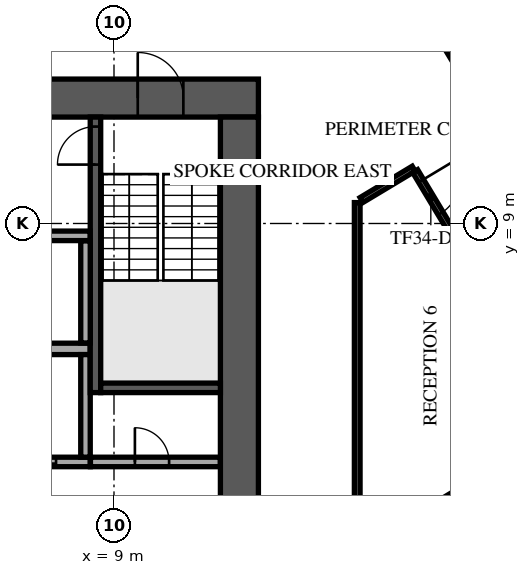
"""IFC4 building model, lengths in metres.
Left out: names, types, materials, properties, quantities, classifications, styles, units other than length and angle.
Written with IfcOpenShell. Run it as: python <this file> out.ifc"""

import sys

from ifc_helpers import new_model, si_unit, direction, frame, frame_2d, origin, place, context, subcontext, project, spatial, rectangle, extrude, element, fill, save


model = new_model("IFC4")
c1 = context("Model", 3, precision=1e-05, world=origin(), true_north=direction((0.0, 1.0)))
c2 = subcontext(c1, "Body", "Model", "MODEL_VIEW")
j1 = project(units=[si_unit("LENGTHUNIT", "METRE"), si_unit("PLANEANGLEUNIT", "RADIAN")], contexts=[c1])
p1 = place(None, origin())
s1 = spatial("IfcSite", under=j1, at=p1, CompositionType="ELEMENT")
p2 = place(p1, origin())
s2 = spatial("IfcBuilding", under=s1, at=p2, CompositionType="ELEMENT")
p3 = place(p2, frame((0.0, 0.0, 147.7)))
s3 = spatial("IfcBuildingStorey", under=s2, at=p3, CompositionType="ELEMENT", Elevation=147.7)
p4 = place(p3, frame((-12.8, 12.3, 0.0), z_axis=(0.0, 0.0, 1.0), x_axis=(1.0, 0.0, 0.0)))
e1 = element("IfcWall", 1, at=p4, inside=s3, PredefinedType="SHEAR", context=c2, shape_type="SweptSolid", body=[
    extrude(rectangle(XDim=25.6, YDim=1.0, at=frame_2d((12.8, 0.0))), origin(), (0.0, 0.0, 1.0), 3.6),
])
p5 = place(p4, frame((11.6, 0.0, 0.0)))
e2 = element("IfcOpeningElement", 2, at=p5, cuts=e1, PredefinedType="OPENING", context=c2, shape_type="SweptSolid", body=[
    extrude(rectangle(XDim=2.4, YDim=2.4, at=frame_2d((1.2, 1.2))), frame((0.0, 0.51, 0.0), z_axis=(0.0, -1.0, 0.0), x_axis=(1.0, 0.0, 0.0)), (0.0, 0.0, 1.0), 1.02),
])
p6 = place(p4, frame((22.425, 0.0, 0.0)))
e3 = element("IfcOpeningElement", 3, at=p6, cuts=e1, PredefinedType="OPENING", context=c2, shape_type="SweptSolid", body=[
    extrude(rectangle(XDim=1.2, YDim=2.1, at=frame_2d((0.6, 1.05))), frame((0.0, 0.51, 0.0), z_axis=(0.0, -1.0, 0.0), x_axis=(1.0, 0.0, 0.0)), (0.0, 0.0, 1.0), 1.02),
])
p7 = place(p4, frame((1.4, 0.0, 0.0)))
e4 = element("IfcOpeningElement", 4, at=p7, cuts=e1, PredefinedType="OPENING", context=c2, shape_type="SweptSolid", body=[
    extrude(rectangle(XDim=1.0, YDim=2.1, at=frame_2d((0.5, 1.05))), frame((0.0, 0.51, 0.0), z_axis=(0.0, -1.0, 0.0), x_axis=(1.0, 0.0, 0.0)), (0.0, 0.0, 1.0), 1.02),
])
p8 = place(p3, frame((12.3, -11.8, 0.0), z_axis=(0.0, 0.0, 1.0), x_axis=(0.0, 1.0, 0.0)))
e5 = element("IfcWall", 5, at=p8, inside=s3, PredefinedType="SHEAR", context=c2, shape_type="SweptSolid", body=[
    extrude(rectangle(XDim=23.6, YDim=1.0, at=frame_2d((11.8, 0.0))), origin(), (0.0, 0.0, 1.0), 3.6),
])
p9 = place(p8, frame((10.6, 0.0, 0.0)))
e6 = element("IfcOpeningElement", 6, at=p9, cuts=e5, PredefinedType="OPENING", context=c2, shape_type="SweptSolid", body=[
    extrude(rectangle(XDim=2.4, YDim=2.4, at=frame_2d((1.2, 1.2))), frame((0.0, 0.51, 0.0), z_axis=(0.0, -1.0, 0.0), x_axis=(1.0, 0.0, 0.0)), (0.0, 0.0, 1.0), 1.02),
])
p10 = place(p3, frame((-8.375, 5.7, 0.0), z_axis=(0.0, 0.0, 1.0), x_axis=(1.0, 0.0, 0.0)))
e7 = element("IfcWall", 7, at=p10, inside=s3, PredefinedType="SOLIDWALL", context=c2, shape_type="SweptSolid", body=[
    extrude(rectangle(XDim=16.75, YDim=0.3, at=frame_2d((8.375, 0.0))), origin(), (0.0, 0.0, 1.0), 3.6),
])
p11 = place(p3, frame((-8.375, 2.725, 0.0), z_axis=(0.0, 0.0, 1.0), x_axis=(1.0, 0.0, 0.0)))
e8 = element("IfcWall", 8, at=p11, inside=s3, PredefinedType="SOLIDWALL", context=c2, shape_type="SweptSolid", body=[
    extrude(rectangle(XDim=16.75, YDim=0.25, at=frame_2d((8.375, 0.0))), origin(), (0.0, 0.0, 1.0), 3.6),
])
p12 = place(p11, frame((0.9, 0.0, 0.0)))
e9 = element("IfcOpeningElement", 9, at=p12, cuts=e8, PredefinedType="OPENING", context=c2, shape_type="SweptSolid", body=[
    extrude(rectangle(XDim=1.2, YDim=2.1, at=frame_2d((0.6, 1.05))), frame((0.0, 0.135, 0.0), z_axis=(0.0, -1.0, 0.0), x_axis=(1.0, 0.0, 0.0)), (0.0, 0.0, 1.0), 0.27),
])
p13 = place(p11, frame((3.65, 0.0, 0.0)))
e10 = element("IfcOpeningElement", 10, at=p13, cuts=e8, PredefinedType="OPENING", context=c2, shape_type="SweptSolid", body=[
    extrude(rectangle(XDim=1.2, YDim=2.1, at=frame_2d((0.6, 1.05))), frame((0.0, 0.135, 0.0), z_axis=(0.0, -1.0, 0.0), x_axis=(1.0, 0.0, 0.0)), (0.0, 0.0, 1.0), 0.27),
])
p14 = place(p11, frame((6.4, 0.0, 0.0)))
e11 = element("IfcOpeningElement", 11, at=p14, cuts=e8, PredefinedType="OPENING", context=c2, shape_type="SweptSolid", body=[
    extrude(rectangle(XDim=1.2, YDim=2.1, at=frame_2d((0.6, 1.05))), frame((0.0, 0.135, 0.0), z_axis=(0.0, -1.0, 0.0), x_axis=(1.0, 0.0, 0.0)), (0.0, 0.0, 1.0), 0.27),
])
p15 = place(p11, frame((9.15, 0.0, 0.0)))
e12 = element("IfcOpeningElement", 12, at=p15, cuts=e8, PredefinedType="OPENING", context=c2, shape_type="SweptSolid", body=[
    extrude(rectangle(XDim=1.2, YDim=2.1, at=frame_2d((0.6, 1.05))), frame((0.0, 0.135, 0.0), z_axis=(0.0, -1.0, 0.0), x_axis=(1.0, 0.0, 0.0)), (0.0, 0.0, 1.0), 0.27),
])
p16 = place(p11, frame((11.9, 0.0, 0.0)))
e13 = element("IfcOpeningElement", 13, at=p16, cuts=e8, PredefinedType="OPENING", context=c2, shape_type="SweptSolid", body=[
    extrude(rectangle(XDim=1.2, YDim=2.1, at=frame_2d((0.6, 1.05))), frame((0.0, 0.135, 0.0), z_axis=(0.0, -1.0, 0.0), x_axis=(1.0, 0.0, 0.0)), (0.0, 0.0, 1.0), 0.27),
])
p17 = place(p11, frame((14.65, 0.0, 0.0)))
e14 = element("IfcOpeningElement", 14, at=p17, cuts=e8, PredefinedType="OPENING", context=c2, shape_type="SweptSolid", body=[
    extrude(rectangle(XDim=1.2, YDim=2.1, at=frame_2d((0.6, 1.05))), frame((0.0, 0.135, 0.0), z_axis=(0.0, -1.0, 0.0), x_axis=(1.0, 0.0, 0.0)), (0.0, 0.0, 1.0), 0.27),
])
p18 = place(p3, frame((8.25, 2.85, 0.0), z_axis=(0.0, 0.0, 1.0), x_axis=(0.0, 1.0, 0.0)))
e15 = element("IfcWall", 15, at=p18, inside=s3, PredefinedType="SOLIDWALL", context=c2, shape_type="SweptSolid", body=[
    extrude(rectangle(XDim=2.7, YDim=0.25, at=frame_2d((1.35, 0.0))), origin(), (0.0, 0.0, 1.0), 3.6),
])
p19 = place(p3, frame((8.512, 4.55, 0.0), z_axis=(0.0, 0.0, 1.0), x_axis=(0.0, 1.0, 0.0)))
e16 = element("IfcWall", 16, at=p19, inside=s3, PredefinedType="SOLIDWALL", context=c2, shape_type="SweptSolid", body=[
    extrude(rectangle(XDim=7.25, YDim=0.275, at=frame_2d((3.625, 0.0))), origin(), (0.0, 0.0, 1.0), 3.6),
])
p20 = place(p19, frame((6.0, 0.0, 0.0)))
e17 = element("IfcOpeningElement", 17, at=p20, cuts=e16, PredefinedType="OPENING", context=c2, shape_type="SweptSolid", body=[
    extrude(rectangle(XDim=1.0, YDim=2.1, at=frame_2d((0.5, 1.05))), frame((0.0, 0.147, 0.0), z_axis=(0.0, -1.0, 0.0), x_axis=(1.0, 0.0, 0.0)), (0.0, 0.0, 1.0), 0.295),
])
p21 = place(p3, frame((8.65, 4.675, 0.0), z_axis=(0.0, 0.0, 1.0), x_axis=(1.0, 0.0, 0.0)))
e18 = element("IfcWall", 18, at=p21, inside=s3, PredefinedType="SOLIDWALL", context=c2, shape_type="SweptSolid", body=[
    extrude(rectangle(XDim=3.15, YDim=0.25, at=frame_2d((1.575, 0.0))), origin(), (0.0, 0.0, 1.0), 3.6),
])
p22 = place(p3, frame((8.38, 2.725, 0.0), z_axis=(0.0, 0.0, 1.0), x_axis=(1.0, 0.0, 0.0)))
e19 = element("IfcWall", 19, at=p22, inside=s3, PredefinedType="PARTITIONING", context=c2, shape_type="SweptSolid", body=[
    extrude(rectangle(XDim=3.415, YDim=0.25, at=frame_2d((1.708, 0.0))), origin(), (0.0, 0.0, 1.0), 3.6),
])
p23 = place(p22, frame((1.17, 0.0, 0.0)))
e20 = element("IfcOpeningElement", 20, at=p23, cuts=e19, PredefinedType="OPENING", context=c2, shape_type="SweptSolid", body=[
    extrude(rectangle(XDim=0.9, YDim=2.1, at=frame_2d((0.45, 1.05))), frame((0.0, 0.135, 0.0), z_axis=(0.0, -1.0, 0.0), x_axis=(1.0, 0.0, 0.0)), (0.0, 0.0, 1.0), 0.27),
])
p24 = place(p3, frame((8.25, 5.855, 0.0), z_axis=(0.0, 0.0, 1.0), x_axis=(0.0, 1.0, 0.0)))
e21 = element("IfcWall", 21, at=p24, inside=s3, PredefinedType="PARTITIONING", context=c2, shape_type="SweptSolid", body=[
    extrude(rectangle(XDim=2.69, YDim=0.25, at=frame_2d((1.345, 0.0))), origin(), (0.0, 0.0, 1.0), 3.6),
])
p25 = place(p3, frame((-8.35, 8.675, 0.0), z_axis=(0.0, 0.0, 1.0), x_axis=(1.0, 0.0, 0.0)))
e22 = element("IfcWall", 22, at=p25, inside=s3, PredefinedType="PARTITIONING", context=c2, shape_type="SweptSolid", body=[
    extrude(rectangle(XDim=16.72, YDim=0.25, at=frame_2d((8.36, 0.0))), origin(), (0.0, 0.0, 1.0), 3.6),
])
p26 = place(p25, frame((0.875, 0.0, 0.0)))
e23 = element("IfcOpeningElement", 23, at=p26, cuts=e22, PredefinedType="OPENING", context=c2, shape_type="SweptSolid", body=[
    extrude(rectangle(XDim=1.2, YDim=2.1, at=frame_2d((0.6, 1.05))), frame((0.0, 0.135, 0.0), z_axis=(0.0, -1.0, 0.0), x_axis=(1.0, 0.0, 0.0)), (0.0, 0.0, 1.0), 0.27),
])
p27 = place(p25, frame((9.125, 0.0, 0.0)))
e24 = element("IfcOpeningElement", 24, at=p27, cuts=e22, PredefinedType="OPENING", context=c2, shape_type="SweptSolid", body=[
    extrude(rectangle(XDim=1.2, YDim=2.1, at=frame_2d((0.6, 1.05))), frame((0.0, 0.135, 0.0), z_axis=(0.0, -1.0, 0.0), x_axis=(1.0, 0.0, 0.0)), (0.0, 0.0, 1.0), 0.27),
])
p28 = place(p3, frame((7.558, 34.99, 0.0), z_axis=(0.0, 0.0, 1.0), x_axis=(-0.857166849875, -0.515038825212, 0.0)))
e25 = element("IfcWall", 25, at=p28, inside=s3, PredefinedType="STANDARD", context=c2, shape_type="SweptSolid", body=[
    extrude(rectangle(XDim=49.376, YDim=0.6, at=frame_2d((24.688, 0.0))), origin(), (0.0, 0.0, 1.0), 3.6),
])
p29 = place(p28, frame((1.2, 0.0, 0.9)))
e26 = element("IfcOpeningElement", 26, at=p29, cuts=e25, PredefinedType="OPENING", context=c2, shape_type="SweptSolid", body=[
    extrude(rectangle(XDim=2.1, YDim=2.1, at=frame_2d((1.05, 1.05))), frame((0.0, 0.31, 0.0), z_axis=(0.0, -1.0, 0.0), x_axis=(1.0, 0.0, 0.0)), (0.0, 0.0, 1.0), 0.62),
])
p30 = place(p28, frame((5.7, 0.0, 0.9)))
e27 = element("IfcOpeningElement", 27, at=p30, cuts=e25, PredefinedType="OPENING", context=c2, shape_type="SweptSolid", body=[
    extrude(rectangle(XDim=2.1, YDim=2.1, at=frame_2d((1.05, 1.05))), frame((0.0, 0.31, 0.0), z_axis=(0.0, -1.0, 0.0), x_axis=(1.0, 0.0, 0.0)), (0.0, 0.0, 1.0), 0.62),
])
p31 = place(p28, frame((10.2, 0.0, 0.9)))
e28 = element("IfcOpeningElement", 28, at=p31, cuts=e25, PredefinedType="OPENING", context=c2, shape_type="SweptSolid", body=[
    extrude(rectangle(XDim=2.1, YDim=2.1, at=frame_2d((1.05, 1.05))), frame((0.0, 0.31, 0.0), z_axis=(0.0, -1.0, 0.0), x_axis=(1.0, 0.0, 0.0)), (0.0, 0.0, 1.0), 0.62),
])
p32 = place(p28, frame((14.7, 0.0, 0.9)))
e29 = element("IfcOpeningElement", 29, at=p32, cuts=e25, PredefinedType="OPENING", context=c2, shape_type="SweptSolid", body=[
    extrude(rectangle(XDim=2.1, YDim=2.1, at=frame_2d((1.05, 1.05))), frame((0.0, 0.31, 0.0), z_axis=(0.0, -1.0, 0.0), x_axis=(1.0, 0.0, 0.0)), (0.0, 0.0, 1.0), 0.62),
])
p33 = place(p28, frame((19.2, 0.0, 0.9)))
e30 = element("IfcOpeningElement", 30, at=p33, cuts=e25, PredefinedType="OPENING", context=c2, shape_type="SweptSolid", body=[
    extrude(rectangle(XDim=2.1, YDim=2.1, at=frame_2d((1.05, 1.05))), frame((0.0, 0.31, 0.0), z_axis=(0.0, -1.0, 0.0), x_axis=(1.0, 0.0, 0.0)), (0.0, 0.0, 1.0), 0.62),
])
p34 = place(p28, frame((23.7, 0.0, 0.9)))
e31 = element("IfcOpeningElement", 31, at=p34, cuts=e25, PredefinedType="OPENING", context=c2, shape_type="SweptSolid", body=[
    extrude(rectangle(XDim=2.1, YDim=2.1, at=frame_2d((1.05, 1.05))), frame((0.0, 0.31, 0.0), z_axis=(0.0, -1.0, 0.0), x_axis=(1.0, 0.0, 0.0)), (0.0, 0.0, 1.0), 0.62),
])
p35 = place(p28, frame((28.2, 0.0, 0.9)))
e32 = element("IfcOpeningElement", 32, at=p35, cuts=e25, PredefinedType="OPENING", context=c2, shape_type="SweptSolid", body=[
    extrude(rectangle(XDim=2.1, YDim=2.1, at=frame_2d((1.05, 1.05))), frame((0.0, 0.31, 0.0), z_axis=(0.0, -1.0, 0.0), x_axis=(1.0, 0.0, 0.0)), (0.0, 0.0, 1.0), 0.62),
])
p36 = place(p28, frame((32.7, 0.0, 0.9)))
e33 = element("IfcOpeningElement", 33, at=p36, cuts=e25, PredefinedType="OPENING", context=c2, shape_type="SweptSolid", body=[
    extrude(rectangle(XDim=2.1, YDim=2.1, at=frame_2d((1.05, 1.05))), frame((0.0, 0.31, 0.0), z_axis=(0.0, -1.0, 0.0), x_axis=(1.0, 0.0, 0.0)), (0.0, 0.0, 1.0), 0.62),
])
p37 = place(p28, frame((37.2, 0.0, 0.9)))
e34 = element("IfcOpeningElement", 34, at=p37, cuts=e25, PredefinedType="OPENING", context=c2, shape_type="SweptSolid", body=[
    extrude(rectangle(XDim=2.1, YDim=2.1, at=frame_2d((1.05, 1.05))), frame((0.0, 0.31, 0.0), z_axis=(0.0, -1.0, 0.0), x_axis=(1.0, 0.0, 0.0)), (0.0, 0.0, 1.0), 0.62),
])
p38 = place(p28, frame((41.7, 0.0, 0.9)))
e35 = element("IfcOpeningElement", 35, at=p38, cuts=e25, PredefinedType="OPENING", context=c2, shape_type="SweptSolid", body=[
    extrude(rectangle(XDim=2.1, YDim=2.1, at=frame_2d((1.05, 1.05))), frame((0.0, 0.31, 0.0), z_axis=(0.0, -1.0, 0.0), x_axis=(1.0, 0.0, 0.0)), (0.0, 0.0, 1.0), 0.62),
])
p39 = place(p28, frame((46.138, 0.0, 0.9)))
e36 = element("IfcOpeningElement", 36, at=p39, cuts=e25, PredefinedType="OPENING", context=c2, shape_type="SweptSolid", body=[
    extrude(rectangle(XDim=2.1, YDim=2.1, at=frame_2d((1.05, 1.05))), frame((0.0, 0.31, 0.0), z_axis=(0.0, -1.0, 0.0), x_axis=(1.0, 0.0, 0.0)), (0.0, 0.0, 1.0), 0.62),
])
p40 = place(p3, frame((36.416, -2.94, 0.0), z_axis=(0.0, 0.0, 1.0), x_axis=(-0.515039615037, 0.857166375299, 0.0)))
e37 = element("IfcWall", 37, at=p40, inside=s3, PredefinedType="STANDARD", context=c2, shape_type="SweptSolid", body=[
    extrude(rectangle(XDim=42.176, YDim=0.6, at=frame_2d((21.088, 0.0))), origin(), (0.0, 0.0, 1.0), 3.6),
])
p41 = place(p40, frame((1.138, 0.0, 0.9)))
e38 = element("IfcOpeningElement", 38, at=p41, cuts=e37, PredefinedType="OPENING", context=c2, shape_type="SweptSolid", body=[
    extrude(rectangle(XDim=2.3, YDim=2.1, at=frame_2d((1.15, 1.05))), frame((0.0, 0.31, 0.0), z_axis=(0.0, -1.0, 0.0), x_axis=(1.0, 0.0, 0.0)), (0.0, 0.0, 1.0), 0.62),
])
p42 = place(p40, frame((5.776, 0.0, 0.9)))
e39 = element("IfcOpeningElement", 39, at=p42, cuts=e37, PredefinedType="OPENING", context=c2, shape_type="SweptSolid", body=[
    extrude(rectangle(XDim=2.3, YDim=2.1, at=frame_2d((1.15, 1.05))), frame((0.0, 0.31, 0.0), z_axis=(0.0, -1.0, 0.0), x_axis=(1.0, 0.0, 0.0)), (0.0, 0.0, 1.0), 0.62),
])
p43 = place(p40, frame((10.476, 0.0, 0.9)))
e40 = element("IfcOpeningElement", 40, at=p43, cuts=e37, PredefinedType="OPENING", context=c2, shape_type="SweptSolid", body=[
    extrude(rectangle(XDim=2.3, YDim=2.1, at=frame_2d((1.15, 1.05))), frame((0.0, 0.31, 0.0), z_axis=(0.0, -1.0, 0.0), x_axis=(1.0, 0.0, 0.0)), (0.0, 0.0, 1.0), 0.62),
])
p44 = place(p40, frame((15.176, 0.0, 0.9)))
e41 = element("IfcOpeningElement", 41, at=p44, cuts=e37, PredefinedType="OPENING", context=c2, shape_type="SweptSolid", body=[
    extrude(rectangle(XDim=2.3, YDim=2.1, at=frame_2d((1.15, 1.05))), frame((0.0, 0.31, 0.0), z_axis=(0.0, -1.0, 0.0), x_axis=(1.0, 0.0, 0.0)), (0.0, 0.0, 1.0), 0.62),
])
p45 = place(p40, frame((19.876, 0.0, 0.9)))
e42 = element("IfcOpeningElement", 42, at=p45, cuts=e37, PredefinedType="OPENING", context=c2, shape_type="SweptSolid", body=[
    extrude(rectangle(XDim=2.3, YDim=2.1, at=frame_2d((1.15, 1.05))), frame((0.0, 0.31, 0.0), z_axis=(0.0, -1.0, 0.0), x_axis=(1.0, 0.0, 0.0)), (0.0, 0.0, 1.0), 0.62),
])
p46 = place(p40, frame((24.576, 0.0, 0.9)))
e43 = element("IfcOpeningElement", 43, at=p46, cuts=e37, PredefinedType="OPENING", context=c2, shape_type="SweptSolid", body=[
    extrude(rectangle(XDim=2.3, YDim=2.1, at=frame_2d((1.15, 1.05))), frame((0.0, 0.31, 0.0), z_axis=(0.0, -1.0, 0.0), x_axis=(1.0, 0.0, 0.0)), (0.0, 0.0, 1.0), 0.62),
])
p47 = place(p40, frame((29.276, 0.0, 0.9)))
e44 = element("IfcOpeningElement", 44, at=p47, cuts=e37, PredefinedType="OPENING", context=c2, shape_type="SweptSolid", body=[
    extrude(rectangle(XDim=2.3, YDim=2.1, at=frame_2d((1.15, 1.05))), frame((0.0, 0.31, 0.0), z_axis=(0.0, -1.0, 0.0), x_axis=(1.0, 0.0, 0.0)), (0.0, 0.0, 1.0), 0.62),
])
p48 = place(p40, frame((33.976, 0.0, 0.9)))
e45 = element("IfcOpeningElement", 45, at=p48, cuts=e37, PredefinedType="OPENING", context=c2, shape_type="SweptSolid", body=[
    extrude(rectangle(XDim=2.3, YDim=2.1, at=frame_2d((1.15, 1.05))), frame((0.0, 0.31, 0.0), z_axis=(0.0, -1.0, 0.0), x_axis=(1.0, 0.0, 0.0)), (0.0, 0.0, 1.0), 0.62),
])
p49 = place(p40, frame((38.676, 0.0, 0.9)))
e46 = element("IfcOpeningElement", 46, at=p49, cuts=e37, PredefinedType="OPENING", context=c2, shape_type="SweptSolid", body=[
    extrude(rectangle(XDim=2.3, YDim=2.1, at=frame_2d((1.15, 1.05))), frame((0.0, 0.31, 0.0), z_axis=(0.0, -1.0, 0.0), x_axis=(1.0, 0.0, 0.0)), (0.0, 0.0, 1.0), 0.62),
])
p50 = place(p3, frame((11.76, 23.633, 0.0), z_axis=(0.0, 0.0, 1.0), x_axis=(0.515060503771, -0.857153823684, 0.0)))
e47 = element("IfcWall", 47, at=p50, inside=s3, PredefinedType="PARTITIONING", context=c2, shape_type="SweptSolid", body=[
    extrude(rectangle(XDim=28.475, YDim=0.15, at=frame_2d((14.238, 0.0))), origin(), (0.0, 0.0, 1.0), 3.15),
])
p51 = place(p50, frame((12.149, 0.0, 0.0)))
e48 = element("IfcOpeningElement", 48, at=p51, cuts=e47, PredefinedType="OPENING", context=c2, shape_type="SweptSolid", body=[
    extrude(rectangle(XDim=1.0, YDim=2.1, at=frame_2d((0.5, 1.05))), frame((0.0, 0.085, 0.0), z_axis=(0.0, -1.0, 0.0), x_axis=(1.0, 0.0, 0.0)), (0.0, 0.0, 1.0), 0.17),
])
p52 = place(p50, frame((19.62, 0.0, 0.0)))
e49 = element("IfcOpeningElement", 49, at=p52, cuts=e47, PredefinedType="OPENING", context=c2, shape_type="SweptSolid", body=[
    extrude(rectangle(XDim=1.0, YDim=2.1, at=frame_2d((0.5, 1.05))), frame((0.0, 0.085, 0.0), z_axis=(0.0, -1.0, 0.0), x_axis=(1.0, 0.0, 0.0)), (0.0, 0.0, 1.0), 0.17),
])
p53 = place(p50, frame((26.005, 0.0, 0.0)))
e50 = element("IfcOpeningElement", 50, at=p53, cuts=e47, PredefinedType="OPENING", context=c2, shape_type="SweptSolid", body=[
    extrude(rectangle(XDim=1.8, YDim=2.1, at=frame_2d((0.9, 1.05))), frame((0.0, 0.085, 0.0), z_axis=(0.0, -1.0, 0.0), x_axis=(1.0, 0.0, 0.0)), (0.0, 0.0, 1.0), 0.17),
])
p54 = place(p3, frame((15.4, -9.867, 0.0), z_axis=(0.0, 0.0, 1.0), x_axis=(0.0, 1.0, 0.0)))
e51 = element("IfcWall", 51, at=p54, inside=s3, PredefinedType="PARTITIONING", context=c2, shape_type="SweptSolid", body=[
    extrude(rectangle(XDim=19.417, YDim=0.15, at=frame_2d((9.709, 0.0))), origin(), (0.0, 0.0, 1.0), 3.15),
])
p55 = place(p54, frame((2.55, 0.0, 0.0)))
e52 = element("IfcOpeningElement", 52, at=p55, cuts=e51, PredefinedType="OPENING", context=c2, shape_type="SweptSolid", body=[
    extrude(rectangle(XDim=1.0, YDim=2.1, at=frame_2d((0.5, 1.05))), frame((0.0, 0.085, 0.0), z_axis=(0.0, -1.0, 0.0), x_axis=(1.0, 0.0, 0.0)), (0.0, 0.0, 1.0), 0.17),
])
p56 = place(p3, frame((15.514, 9.618, 0.0), z_axis=(0.0, 0.0, 1.0), x_axis=(0.857129434102, 0.515101090268, 0.0)))
e53 = element("IfcWall", 53, at=p56, inside=s3, PredefinedType="PARTITIONING", context=c2, shape_type="SweptSolid", body=[
    extrude(rectangle(XDim=1.601, YDim=0.15, at=frame_2d((0.801, 0.0))), origin(), (0.0, 0.0, 1.0), 3.15),
])
p57 = place(p3, frame((16.925, 10.379, 0.0), z_axis=(0.0, 0.0, 1.0), x_axis=(0.515094231421, -0.857133555962, 0.0)))
e54 = element("IfcWall", 54, at=p57, inside=s3, PredefinedType="PARTITIONING", context=c2, shape_type="SweptSolid", body=[
    extrude(rectangle(XDim=14.455, YDim=0.15, at=frame_2d((7.228, 0.0))), origin(), (0.0, 0.0, 1.0), 3.15),
])
p58 = place(p57, frame((0.3, 0.0, 0.0)))
e55 = element("IfcOpeningElement", 55, at=p58, cuts=e54, PredefinedType="OPENING", context=c2, shape_type="SweptSolid", body=[
    extrude(rectangle(XDim=1.0, YDim=2.1, at=frame_2d((0.5, 1.05))), frame((0.0, 0.085, 0.0), z_axis=(0.0, -1.0, 0.0), x_axis=(1.0, 0.0, 0.0)), (0.0, 0.0, 1.0), 0.17),
])
p59 = place(p57, frame((8.348, 0.0, 0.0)))
e56 = element("IfcOpeningElement", 56, at=p59, cuts=e54, PredefinedType="OPENING", context=c2, shape_type="SweptSolid", body=[
    extrude(rectangle(XDim=1.0, YDim=2.1, at=frame_2d((0.5, 1.05))), frame((0.0, 0.085, 0.0), z_axis=(0.0, -1.0, 0.0), x_axis=(1.0, 0.0, 0.0)), (0.0, 0.0, 1.0), 0.17),
])
p60 = place(p3, frame((15.501, 0.426, 0.0), z_axis=(0.0, 0.0, 1.0), x_axis=(0.857114899057, 0.515125275845, 0.0)))
e57 = element("IfcWall", 57, at=p60, inside=s3, PredefinedType="PARTITIONING", context=c2, shape_type="SweptSolid", body=[
    extrude(rectangle(XDim=6.272, YDim=0.1, at=frame_2d((3.136, 0.0))), origin(), (0.0, 0.0, 1.0), 3.15),
])
p61 = place(p6, origin())
e58 = element("IfcDoor", 58, at=p61, inside=s3, OperationType="SINGLE_SWING_LEFT", PredefinedType="DOOR", context=c2, shape_type="SweptSolid", body=[
    extrude(rectangle(XDim=1.2, YDim=2.1, at=frame_2d((0.6, 1.05))), frame((0.0, 0.025, 0.0), z_axis=(0.0, -1.0, 0.0), x_axis=(1.0, 0.0, 0.0)), (0.0, 0.0, 1.0), 0.05),
])
fill(e3, e58)
p62 = place(p17, origin())
e59 = element("IfcDoor", 59, at=p62, inside=s3, OperationType="DOUBLE_DOOR_SLIDING", PredefinedType="DOOR", context=c2, shape_type="SweptSolid", body=[
    extrude(rectangle(XDim=1.2, YDim=2.1, at=frame_2d((0.6, 1.05))), frame((0.0, 0.025, 0.0), z_axis=(0.0, -1.0, 0.0), x_axis=(1.0, 0.0, 0.0)), (0.0, 0.0, 1.0), 0.05),
])
fill(e14, e59)
p63 = place(p20, origin())
e60 = element("IfcDoor", 60, at=p63, inside=s3, OperationType="SINGLE_SWING_LEFT", PredefinedType="DOOR", context=c2, shape_type="SweptSolid", body=[
    extrude(rectangle(XDim=1.0, YDim=2.1, at=frame_2d((0.5, 1.05))), frame((0.0, 0.025, 0.0), z_axis=(0.0, -1.0, 0.0), x_axis=(1.0, 0.0, 0.0)), (0.0, 0.0, 1.0), 0.05),
])
fill(e17, e60)
p64 = place(p23, origin())
e61 = element("IfcDoor", 61, at=p64, inside=s3, OperationType="SINGLE_SWING_LEFT", PredefinedType="DOOR", context=c2, shape_type="SweptSolid", body=[
    extrude(rectangle(XDim=0.9, YDim=2.1, at=frame_2d((0.45, 1.05))), frame((0.0, 0.025, 0.0), z_axis=(0.0, -1.0, 0.0), x_axis=(1.0, 0.0, 0.0)), (0.0, 0.0, 1.0), 0.05),
])
fill(e20, e61)
p65 = place(p58, frame((1.0, 0.0, 0.0), z_axis=(0.0, 0.0, 1.0), x_axis=(-1.0, 0.0, 0.0)))
e62 = element("IfcDoor", 62, at=p65, inside=s3, OperationType="SINGLE_SWING_RIGHT", PredefinedType="DOOR", context=c2, shape_type="SweptSolid", body=[
    extrude(rectangle(XDim=1.0, YDim=2.1, at=frame_2d((0.5, 1.05))), frame((0.0, 0.025, 0.0), z_axis=(0.0, -1.0, 0.0), x_axis=(1.0, 0.0, 0.0)), (0.0, 0.0, 1.0), 0.05),
])
fill(e55, e62)
save(model, sys.argv[1])
